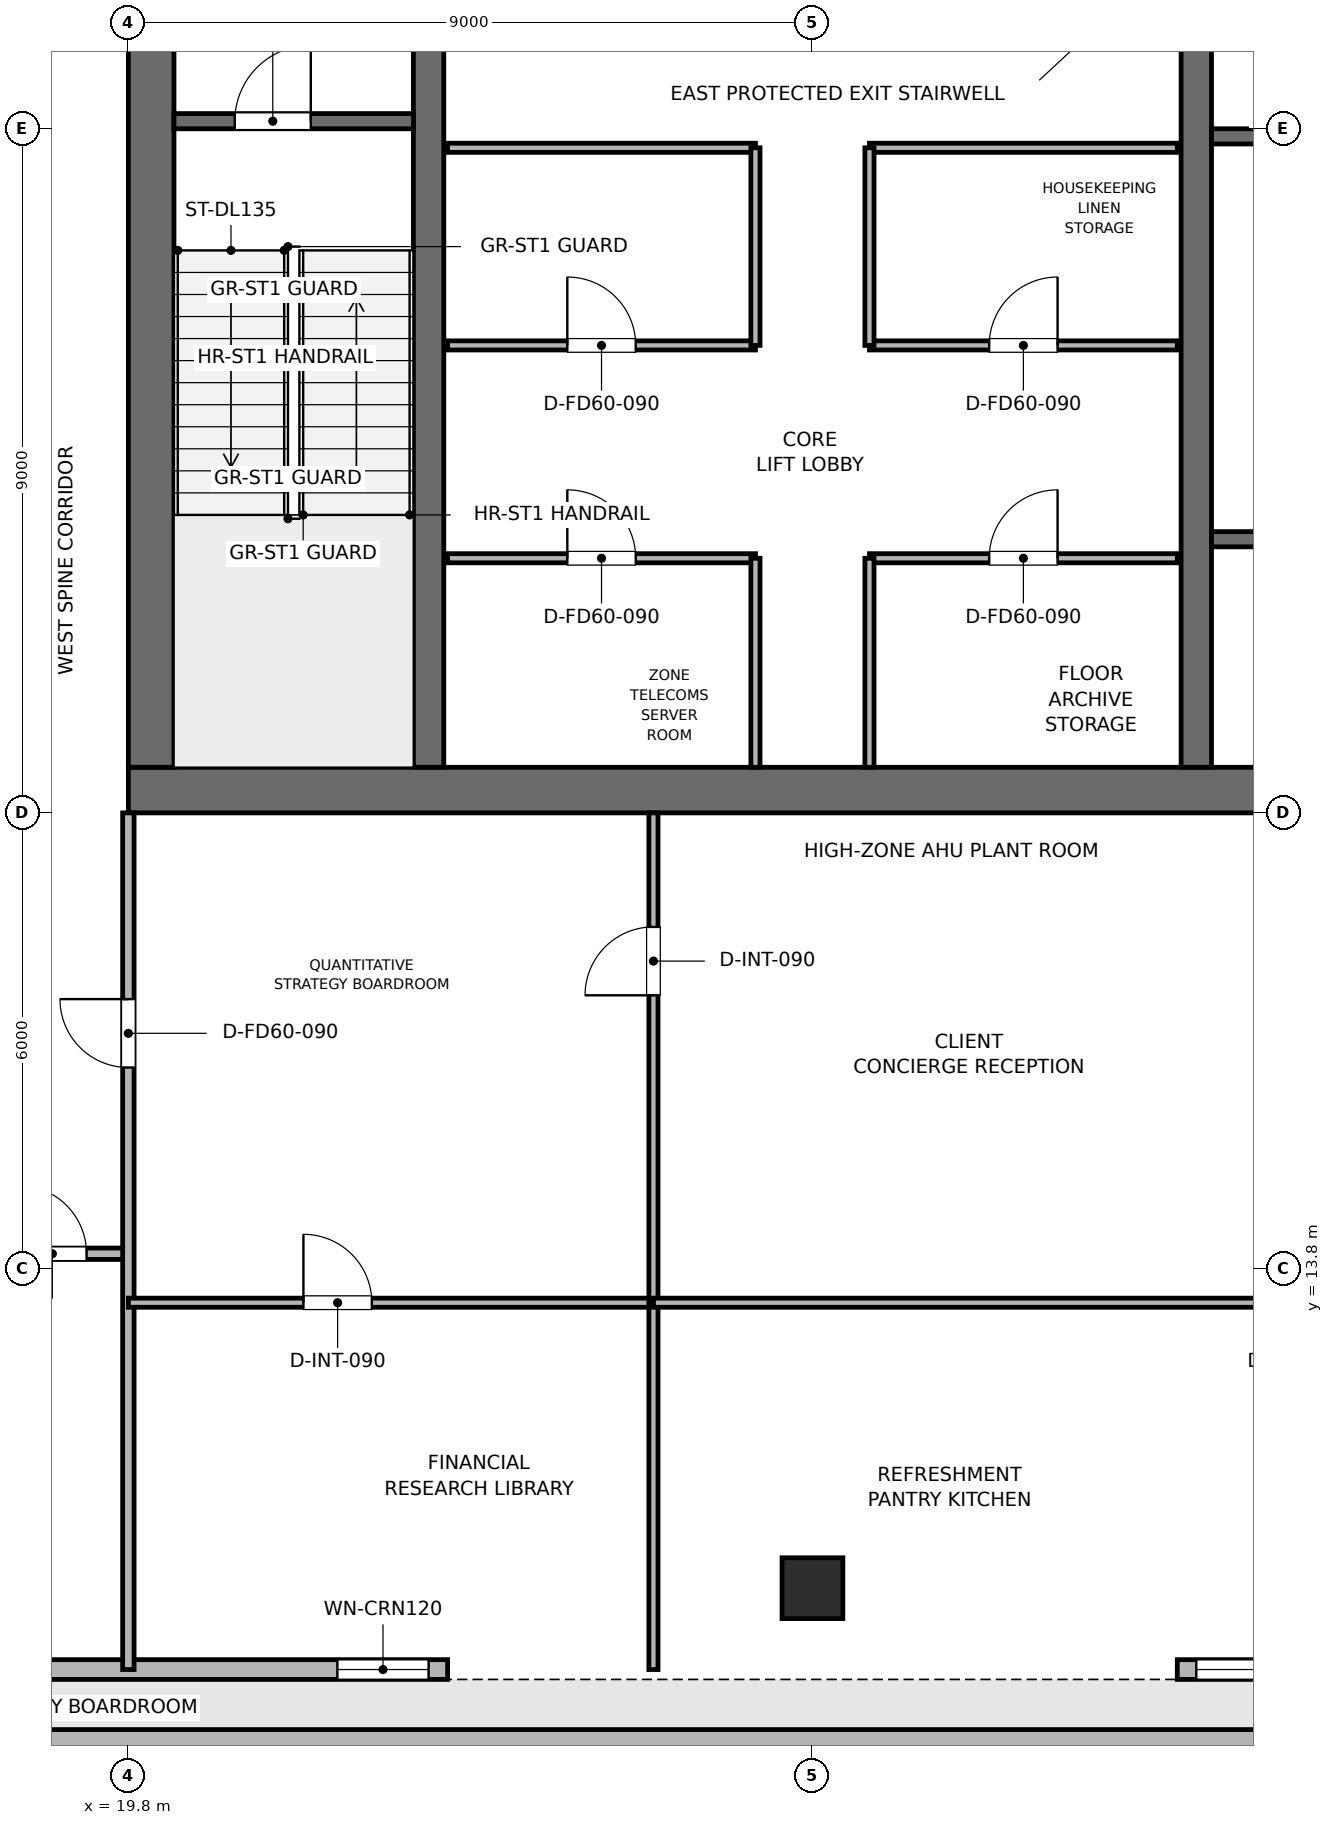
"""IFC4 building model, lengths in metres.
Left out: names, types, materials, properties, quantities, classifications, styles, units other than length and angle.
Written with IfcOpenShell. Run it as: python <this file> out.ifc"""

import sys

from ifc_helpers import new_model, si_unit, direction, frame, frame_2d, origin, origin_2d, place, context, subcontext, project, spatial, rectangle, extrude, element, fill, save


model = new_model("IFC4")
c1 = context("Model", 3, precision=1e-05, world=origin(), true_north=direction((0.0, 1.0)))
c2 = subcontext(c1, "Body", "Model", "MODEL_VIEW")
j1 = project(units=[si_unit("LENGTHUNIT", "METRE"), si_unit("PLANEANGLEUNIT", "RADIAN")], contexts=[c1])
p1 = place(None, origin())
s1 = spatial("IfcSite", under=j1, at=p1, CompositionType="ELEMENT")
p2 = place(p1, origin())
s2 = spatial("IfcBuilding", under=s1, at=p2, CompositionType="ELEMENT")
p3 = place(p2, frame((0.0, 0.0, 355.5)))
s3 = spatial("IfcBuildingStorey", under=s2, at=p3, CompositionType="ELEMENT", Elevation=355.5)
p4 = place(p3, frame((19.8, 20.1, 0.0), z_axis=(0.0, 0.0, 1.0), x_axis=(1.0, 0.0, 0.0)))
e1 = element("IfcWall", 1, at=p4, inside=s3, PredefinedType="SHEAR", context=c2, shape_type="SweptSolid", body=[
    extrude(rectangle(XDim=18.0, YDim=0.6, at=frame_2d((9.0, 0.0))), origin(), (0.0, 0.0, 1.0), 4.5),
])
p5 = place(p3, frame((20.1, 20.4, 0.0), z_axis=(0.0, 0.0, 1.0), x_axis=(0.0, 1.0, 0.0)))
e2 = element("IfcWall", 2, at=p5, inside=s3, PredefinedType="SHEAR", context=c2, shape_type="SweptSolid", body=[
    extrude(rectangle(XDim=16.8, YDim=0.6, at=frame_2d((8.4, 0.0))), origin(), (0.0, 0.0, 1.0), 4.5),
])
p6 = place(p5, frame((10.4, 0.0, 0.0)))
e3 = element("IfcOpeningElement", 3, at=p6, cuts=e2, PredefinedType="OPENING", context=c2, shape_type="SweptSolid", body=[
    extrude(rectangle(XDim=1.1, YDim=2.15, at=frame_2d((0.55, 1.075))), frame((0.0, 0.31, 0.0), z_axis=(0.0, -1.0, 0.0), x_axis=(1.0, 0.0, 0.0)), (0.0, 0.0, 1.0), 0.62),
])
for number, where, z_axis, x_axis in (
    (4, (23.75, 20.4, 0.0), (0.0, 0.0, 1.0), (0.0, 1.0, 0.0)),
    (5, (33.85, 20.4, 0.0), (0.0, 0.0, 1.0), (0.0, 1.0, 0.0)),
):
    element("IfcWall", number, at=place(p3, frame(where, z_axis=z_axis, x_axis=x_axis)), inside=s3, PredefinedType="SHEAR", context=c2, shape_type="SweptSolid", body=[
        extrude(rectangle(XDim=16.8, YDim=0.4, at=frame_2d((8.4, 0.0))), origin(), (0.0, 0.0, 1.0), 4.5),
    ])
p7 = place(p3, frame((28.8, 9.6, 0.003), z_axis=(0.0, 0.0, 1.0), x_axis=(1.0, 0.0, 0.0)))
e6 = element("IfcColumn", 6, at=p7, inside=s3, PredefinedType="COLUMN", context=c2, shape_type="SweptSolid", body=[
    extrude(rectangle(XDim=0.8, YDim=0.8, at=origin_2d()), origin(), (0.0, 0.0, 1.0), 4.234),
])
p8 = place(p3, frame((13.555, 7.62, 0.0), z_axis=(0.0, 0.0, 1.0), x_axis=(1.0, 0.0, 0.0)))
e7 = element("IfcWall", 7, at=p8, inside=s3, PredefinedType="PARAPET", context=c2, shape_type="SweptSolid", body=[
    extrude(rectangle(XDim=30.49, YDim=0.24, at=frame_2d((15.245, 0.0))), origin(), (0.0, 0.0, 1.0), 1.2),
])
p9 = place(p3, frame((43.6, 8.53, 0.0), z_axis=(0.0, 0.0, 1.0), x_axis=(-1.0, 0.0, 0.0)))
e8 = element("IfcWall", 8, at=p9, inside=s3, PredefinedType="SOLIDWALL", context=c2, shape_type="SweptSolid", body=[
    extrude(rectangle(XDim=10.0, YDim=0.26, at=frame_2d((5.0, 0.0))), origin(), (0.0, 0.0, 1.0), 4.24),
])
p10 = place(p9, frame((5.95, 0.0, 0.9)))
e9 = element("IfcOpeningElement", 9, at=p10, cuts=e8, PredefinedType="OPENING", context=c2, shape_type="SweptSolid", body=[
    extrude(rectangle(XDim=3.8, YDim=1.9, at=frame_2d((1.9, 0.95))), frame((0.0, 0.14, 0.0), z_axis=(0.0, -1.0, 0.0), x_axis=(1.0, 0.0, 0.0)), (0.0, 0.0, 1.0), 0.28),
])
p11 = place(p3, frame((24.0, 8.53, 0.0), z_axis=(0.0, 0.0, 1.0), x_axis=(-1.0, 0.0, 0.0)))
e10 = element("IfcWall", 10, at=p11, inside=s3, PredefinedType="SOLIDWALL", context=c2, shape_type="SweptSolid", body=[
    extrude(rectangle(XDim=10.0, YDim=0.26, at=frame_2d((5.0, 0.0))), origin(), (0.0, 0.0, 1.0), 4.24),
])
p12 = place(p11, frame((0.25, 0.0, 0.9)))
e11 = element("IfcOpeningElement", 11, at=p12, cuts=e10, PredefinedType="OPENING", context=c2, shape_type="SweptSolid", body=[
    extrude(rectangle(XDim=1.2, YDim=2.1, at=frame_2d((0.6, 1.05))), frame((0.0, 0.14, 0.0), z_axis=(0.0, -1.0, 0.0), x_axis=(1.0, 0.0, 0.0)), (0.0, 0.0, 1.0), 0.28),
])
p13 = place(p3, frame((20.4, 28.9, 0.0), z_axis=(0.0, 0.0, 1.0), x_axis=(1.0, 0.0, 0.0)))
e12 = element("IfcWall", 12, at=p13, inside=s3, PredefinedType="SHEAR", context=c2, shape_type="SweptSolid", body=[
    extrude(rectangle(XDim=3.15, YDim=0.2, at=frame_2d((1.575, 0.0))), origin(), (0.0, 0.0, 1.0), 4.24),
])
p14 = place(p13, frame((0.8, 0.0, 0.0)))
e13 = element("IfcOpeningElement", 13, at=p14, cuts=e12, PredefinedType="OPENING", context=c2, shape_type="SweptSolid", body=[
    extrude(rectangle(XDim=1.0, YDim=2.1, at=frame_2d((0.5, 1.05))), frame((0.0, 0.11, 0.0), z_axis=(0.0, -1.0, 0.0), x_axis=(1.0, 0.0, 0.0)), (0.0, 0.0, 1.0), 0.22),
])
p15 = place(p3, frame((34.05, 28.7, 0.0), z_axis=(0.0, 0.0, 1.0), x_axis=(1.0, 0.0, 0.0)))
e14 = element("IfcWall", 14, at=p15, inside=s3, PredefinedType="SHEAR", context=c2, shape_type="SweptSolid", body=[
    extrude(rectangle(XDim=3.15, YDim=0.2, at=frame_2d((1.575, 0.0))), origin(), (0.0, 0.0, 1.0), 4.24),
])
p16 = place(p15, frame((0.8, 0.0, 0.0)))
e15 = element("IfcOpeningElement", 15, at=p16, cuts=e14, PredefinedType="OPENING", context=c2, shape_type="SweptSolid", body=[
    extrude(rectangle(XDim=1.0, YDim=2.1, at=frame_2d((0.5, 1.05))), frame((0.0, 0.11, 0.0), z_axis=(0.0, -1.0, 0.0), x_axis=(1.0, 0.0, 0.0)), (0.0, 0.0, 1.0), 0.22),
])
p17 = place(p3, frame((34.05, 23.4, 0.0), z_axis=(0.0, 0.0, 1.0), x_axis=(1.0, 0.0, 0.0)))
e16 = element("IfcWall", 16, at=p17, inside=s3, PredefinedType="SHEAR", context=c2, shape_type="SweptSolid", body=[
    extrude(rectangle(XDim=3.05, YDim=0.2, at=frame_2d((1.525, 0.0))), origin(), (0.0, 0.0, 1.0), 4.24),
])
p18 = place(p17, frame((1.2, 0.0, 0.0)))
e17 = element("IfcOpeningElement", 17, at=p18, cuts=e16, PredefinedType="OPENING", context=c2, shape_type="SweptSolid", body=[
    extrude(rectangle(XDim=1.1, YDim=2.15, at=frame_2d((0.55, 1.075))), frame((0.0, 0.11, 0.0), z_axis=(0.0, -1.0, 0.0), x_axis=(1.0, 0.0, 0.0)), (0.0, 0.0, 1.0), 0.22),
])
p19 = place(p3, frame((24.0, 23.15, 0.0), z_axis=(0.0, 0.0, 1.0), x_axis=(1.0, 0.0, 0.0)))
e18 = element("IfcWall", 18, at=p19, inside=s3, PredefinedType="PARTITIONING", context=c2, shape_type="SweptSolid", body=[
    extrude(rectangle(XDim=4.05, YDim=0.12, at=frame_2d((2.025, 0.0))), origin(), (0.0, 0.0, 1.0), 4.24),
])
p20 = place(p19, frame((1.575, 0.0, 0.0)))
e19 = element("IfcOpeningElement", 19, at=p20, cuts=e18, PredefinedType="OPENING", context=c2, shape_type="SweptSolid", body=[
    extrude(rectangle(XDim=0.9, YDim=2.1, at=frame_2d((0.45, 1.05))), frame((0.0, 0.07, 0.0), z_axis=(0.0, -1.0, 0.0), x_axis=(1.0, 0.0, 0.0)), (0.0, 0.0, 1.0), 0.14),
])
p21 = place(p3, frame((28.05, 20.4, 0.0), z_axis=(0.0, 0.0, 1.0), x_axis=(0.0, 1.0, 0.0)))
e20 = element("IfcWall", 20, at=p21, inside=s3, PredefinedType="PARTITIONING", context=c2, shape_type="SweptSolid", body=[
    extrude(rectangle(XDim=2.75, YDim=0.12, at=frame_2d((1.375, 0.0))), origin(), (0.0, 0.0, 1.0), 4.24),
])
p22 = place(p3, frame((29.55, 23.15, 0.0), z_axis=(0.0, 0.0, 1.0), x_axis=(1.0, 0.0, 0.0)))
e21 = element("IfcWall", 21, at=p22, inside=s3, PredefinedType="PARTITIONING", context=c2, shape_type="SweptSolid", body=[
    extrude(rectangle(XDim=4.05, YDim=0.12, at=frame_2d((2.025, 0.0))), origin(), (0.0, 0.0, 1.0), 4.24),
])
p23 = place(p22, frame((1.575, 0.0, 0.0)))
e22 = element("IfcOpeningElement", 22, at=p23, cuts=e21, PredefinedType="OPENING", context=c2, shape_type="SweptSolid", body=[
    extrude(rectangle(XDim=0.9, YDim=2.1, at=frame_2d((0.45, 1.05))), frame((0.0, 0.07, 0.0), z_axis=(0.0, -1.0, 0.0), x_axis=(1.0, 0.0, 0.0)), (0.0, 0.0, 1.0), 0.14),
])
p24 = place(p3, frame((29.55, 20.4, 0.0), z_axis=(0.0, 0.0, 1.0), x_axis=(0.0, 1.0, 0.0)))
e23 = element("IfcWall", 23, at=p24, inside=s3, PredefinedType="PARTITIONING", context=c2, shape_type="SweptSolid", body=[
    extrude(rectangle(XDim=2.75, YDim=0.12, at=frame_2d((1.375, 0.0))), origin(), (0.0, 0.0, 1.0), 4.24),
])
p25 = place(p3, frame((24.0, 25.95, 0.0), z_axis=(0.0, 0.0, 1.0), x_axis=(1.0, 0.0, 0.0)))
e24 = element("IfcWall", 24, at=p25, inside=s3, PredefinedType="PARTITIONING", context=c2, shape_type="SweptSolid", body=[
    extrude(rectangle(XDim=4.05, YDim=0.12, at=frame_2d((2.025, 0.0))), origin(), (0.0, 0.0, 1.0), 4.24),
])
p26 = place(p25, frame((1.575, 0.0, 0.0)))
e25 = element("IfcOpeningElement", 25, at=p26, cuts=e24, PredefinedType="OPENING", context=c2, shape_type="SweptSolid", body=[
    extrude(rectangle(XDim=0.9, YDim=2.1, at=frame_2d((0.45, 1.05))), frame((0.0, 0.07, 0.0), z_axis=(0.0, -1.0, 0.0), x_axis=(1.0, 0.0, 0.0)), (0.0, 0.0, 1.0), 0.14),
])
p27 = place(p3, frame((24.0, 28.55, 0.0), z_axis=(0.0, 0.0, 1.0), x_axis=(1.0, 0.0, 0.0)))
e26 = element("IfcWall", 26, at=p27, inside=s3, PredefinedType="PARTITIONING", context=c2, shape_type="SweptSolid", body=[
    extrude(rectangle(XDim=4.05, YDim=0.12, at=frame_2d((2.025, 0.0))), origin(), (0.0, 0.0, 1.0), 4.24),
])
p28 = place(p3, frame((28.05, 25.95, 0.0), z_axis=(0.0, 0.0, 1.0), x_axis=(0.0, 1.0, 0.0)))
e27 = element("IfcWall", 27, at=p28, inside=s3, PredefinedType="PARTITIONING", context=c2, shape_type="SweptSolid", body=[
    extrude(rectangle(XDim=2.6, YDim=0.12, at=frame_2d((1.3, 0.0))), origin(), (0.0, 0.0, 1.0), 4.24),
])
p29 = place(p3, frame((29.55, 25.95, 0.0), z_axis=(0.0, 0.0, 1.0), x_axis=(1.0, 0.0, 0.0)))
e28 = element("IfcWall", 28, at=p29, inside=s3, PredefinedType="PARTITIONING", context=c2, shape_type="SweptSolid", body=[
    extrude(rectangle(XDim=4.05, YDim=0.12, at=frame_2d((2.025, 0.0))), origin(), (0.0, 0.0, 1.0), 4.24),
])
p30 = place(p29, frame((1.575, 0.0, 0.0)))
e29 = element("IfcOpeningElement", 29, at=p30, cuts=e28, PredefinedType="OPENING", context=c2, shape_type="SweptSolid", body=[
    extrude(rectangle(XDim=0.9, YDim=2.1, at=frame_2d((0.45, 1.05))), frame((0.0, 0.07, 0.0), z_axis=(0.0, -1.0, 0.0), x_axis=(1.0, 0.0, 0.0)), (0.0, 0.0, 1.0), 0.14),
])
p31 = place(p3, frame((29.55, 28.55, 0.0), z_axis=(0.0, 0.0, 1.0), x_axis=(1.0, 0.0, 0.0)))
e30 = element("IfcWall", 30, at=p31, inside=s3, PredefinedType="PARTITIONING", context=c2, shape_type="SweptSolid", body=[
    extrude(rectangle(XDim=4.05, YDim=0.12, at=frame_2d((2.025, 0.0))), origin(), (0.0, 0.0, 1.0), 4.24),
])
p32 = place(p3, frame((29.55, 25.95, 0.0), z_axis=(0.0, 0.0, 1.0), x_axis=(0.0, 1.0, 0.0)))
e31 = element("IfcWall", 31, at=p32, inside=s3, PredefinedType="PARTITIONING", context=c2, shape_type="SweptSolid", body=[
    extrude(rectangle(XDim=2.6, YDim=0.12, at=frame_2d((1.3, 0.0))), origin(), (0.0, 0.0, 1.0), 4.24),
])
p33 = place(p3, frame((17.9, 14.0, 0.0), z_axis=(0.0, 0.0, 1.0), x_axis=(1.0, 0.0, 0.0)))
e32 = element("IfcWall", 32, at=p33, inside=s3, PredefinedType="PARTITIONING", context=c2, shape_type="SweptSolid", body=[
    extrude(rectangle(XDim=1.9, YDim=0.15, at=frame_2d((0.95, 0.0))), origin(), (0.0, 0.0, 1.0), 4.24),
])
p34 = place(p33, frame((0.45, 0.0, 0.0)))
e33 = element("IfcOpeningElement", 33, at=p34, cuts=e32, PredefinedType="OPENING", context=c2, shape_type="SweptSolid", body=[
    extrude(rectangle(XDim=0.9, YDim=2.1, at=frame_2d((0.45, 1.05))), frame((0.0, 0.085, 0.0), z_axis=(0.0, -1.0, 0.0), x_axis=(1.0, 0.0, 0.0)), (0.0, 0.0, 1.0), 0.17),
])
p35 = place(p3, frame((19.8, 8.53, 0.0), z_axis=(0.0, 0.0, 1.0), x_axis=(0.0, 1.0, 0.0)))
e34 = element("IfcWall", 34, at=p35, inside=s3, PredefinedType="PARTITIONING", context=c2, shape_type="SweptSolid", body=[
    extrude(rectangle(XDim=11.27, YDim=0.15, at=frame_2d((5.635, 0.0))), origin(), (0.0, 0.0, 1.0), 3.825),
])
p36 = place(p35, frame((7.92, 0.0, 0.0)))
e35 = element("IfcOpeningElement", 35, at=p36, cuts=e34, PredefinedType="OPENING", context=c2, shape_type="SweptSolid", body=[
    extrude(rectangle(XDim=0.9, YDim=2.1, at=frame_2d((0.45, 1.05))), frame((0.0, 0.085, 0.0), z_axis=(0.0, -1.0, 0.0), x_axis=(1.0, 0.0, 0.0)), (0.0, 0.0, 1.0), 0.17),
])
p37 = place(p3, frame((19.8, 13.356, 0.0), z_axis=(0.0, 0.0, 1.0), x_axis=(1.0, 0.0, 0.0)))
e36 = element("IfcWall", 36, at=p37, inside=s3, PredefinedType="PARTITIONING", context=c2, shape_type="SweptSolid", body=[
    extrude(rectangle(XDim=6.908, YDim=0.12, at=frame_2d((3.454, 0.0))), origin(), (0.0, 0.0, 1.0), 3.825),
])
p38 = place(p37, frame((2.303, 0.0, 0.0)))
e37 = element("IfcOpeningElement", 37, at=p38, cuts=e36, PredefinedType="OPENING", context=c2, shape_type="SweptSolid", body=[
    extrude(rectangle(XDim=0.9, YDim=2.1, at=frame_2d((0.45, 1.05))), frame((0.0, 0.07, 0.0), z_axis=(0.0, -1.0, 0.0), x_axis=(1.0, 0.0, 0.0)), (0.0, 0.0, 1.0), 0.14),
])
p39 = place(p3, frame((26.708, 8.53, 0.0), z_axis=(0.0, 0.0, 1.0), x_axis=(0.0, 1.0, 0.0)))
e38 = element("IfcWall", 38, at=p39, inside=s3, PredefinedType="PARTITIONING", context=c2, shape_type="SweptSolid", body=[
    extrude(rectangle(XDim=11.27, YDim=0.12, at=frame_2d((5.635, 0.0))), origin(), (0.0, 0.0, 1.0), 3.865),
])
p40 = place(p39, frame((8.87, 0.0, 0.0)))
e39 = element("IfcOpeningElement", 39, at=p40, cuts=e38, PredefinedType="OPENING", context=c2, shape_type="SweptSolid", body=[
    extrude(rectangle(XDim=0.9, YDim=2.1, at=frame_2d((0.45, 1.05))), frame((0.0, 0.07, 0.0), z_axis=(0.0, -1.0, 0.0), x_axis=(1.0, 0.0, 0.0)), (0.0, 0.0, 1.0), 0.14),
])
p41 = place(p3, frame((26.708, 13.356, 0.0), z_axis=(0.0, 0.0, 1.0), x_axis=(1.0, 0.0, 0.0)))
e40 = element("IfcWall", 40, at=p41, inside=s3, PredefinedType="PARTITIONING", context=c2, shape_type="SweptSolid", body=[
    extrude(rectangle(XDim=16.892, YDim=0.12, at=frame_2d((8.446, 0.0))), origin(), (0.0, 0.0, 1.0), 3.825),
])
p42 = place(p41, frame((7.996, 0.0, 0.0)))
e41 = element("IfcOpeningElement", 41, at=p42, cuts=e40, PredefinedType="OPENING", context=c2, shape_type="SweptSolid", body=[
    extrude(rectangle(XDim=0.9, YDim=2.1, at=frame_2d((0.45, 1.05))), frame((0.0, 0.07, 0.0), z_axis=(0.0, -1.0, 0.0), x_axis=(1.0, 0.0, 0.0)), (0.0, 0.0, 1.0), 0.14),
])
p43 = place(p10, origin())
e42 = element("IfcWindow", 42, at=p43, inside=s3, PartitioningType="SINGLE_PANEL", PredefinedType="WINDOW", context=c2, shape_type="SweptSolid", body=[
    extrude(rectangle(XDim=3.8, YDim=1.9, at=frame_2d((1.9, 0.95))), frame((0.0, 0.03, 0.0), z_axis=(0.0, -1.0, 0.0), x_axis=(1.0, 0.0, 0.0)), (0.0, 0.0, 1.0), 0.06),
])
fill(e9, e42)
p44 = place(p12, origin())
e43 = element("IfcWindow", 43, at=p44, inside=s3, PartitioningType="SINGLE_PANEL", PredefinedType="WINDOW", context=c2, shape_type="SweptSolid", body=[
    extrude(rectangle(XDim=1.2, YDim=2.1, at=frame_2d((0.6, 1.05))), frame((0.0, 0.03, 0.0), z_axis=(0.0, -1.0, 0.0), x_axis=(1.0, 0.0, 0.0)), (0.0, 0.0, 1.0), 0.06),
])
fill(e11, e43)
p45 = place(p14, origin())
e44 = element("IfcDoor", 44, at=p45, inside=s3, OperationType="SINGLE_SWING_RIGHT", PredefinedType="DOOR", context=c2, shape_type="SweptSolid", body=[
    extrude(rectangle(XDim=1.0, YDim=2.1, at=frame_2d((0.5, 1.05))), frame((0.0, 0.025, 0.0), z_axis=(0.0, -1.0, 0.0), x_axis=(1.0, 0.0, 0.0)), (0.0, 0.0, 1.0), 0.05),
])
fill(e13, e44)
p46 = place(p20, origin())
e45 = element("IfcDoor", 45, at=p46, inside=s3, OperationType="SINGLE_SWING_LEFT", PredefinedType="DOOR", context=c2, shape_type="SweptSolid", body=[
    extrude(rectangle(XDim=0.9, YDim=2.1, at=frame_2d((0.45, 1.05))), frame((0.0, 0.025, 0.0), z_axis=(0.0, -1.0, 0.0), x_axis=(1.0, 0.0, 0.0)), (0.0, 0.0, 1.0), 0.05),
])
fill(e19, e45)
p47 = place(p23, origin())
e46 = element("IfcDoor", 46, at=p47, inside=s3, OperationType="SINGLE_SWING_RIGHT", PredefinedType="DOOR", context=c2, shape_type="SweptSolid", body=[
    extrude(rectangle(XDim=0.9, YDim=2.1, at=frame_2d((0.45, 1.05))), frame((0.0, 0.025, 0.0), z_axis=(0.0, -1.0, 0.0), x_axis=(1.0, 0.0, 0.0)), (0.0, 0.0, 1.0), 0.05),
])
fill(e22, e46)
p48 = place(p26, origin())
e47 = element("IfcDoor", 47, at=p48, inside=s3, OperationType="SINGLE_SWING_LEFT", PredefinedType="DOOR", context=c2, shape_type="SweptSolid", body=[
    extrude(rectangle(XDim=0.9, YDim=2.1, at=frame_2d((0.45, 1.05))), frame((0.0, 0.025, 0.0), z_axis=(0.0, -1.0, 0.0), x_axis=(1.0, 0.0, 0.0)), (0.0, 0.0, 1.0), 0.05),
])
fill(e25, e47)
p49 = place(p30, origin())
e48 = element("IfcDoor", 48, at=p49, inside=s3, OperationType="SINGLE_SWING_RIGHT", PredefinedType="DOOR", context=c2, shape_type="SweptSolid", body=[
    extrude(rectangle(XDim=0.9, YDim=2.1, at=frame_2d((0.45, 1.05))), frame((0.0, 0.025, 0.0), z_axis=(0.0, -1.0, 0.0), x_axis=(1.0, 0.0, 0.0)), (0.0, 0.0, 1.0), 0.05),
])
fill(e29, e48)
p50 = place(p34, origin())
e49 = element("IfcDoor", 49, at=p50, inside=s3, OperationType="SINGLE_SWING_LEFT", PredefinedType="DOOR", context=c2, shape_type="SweptSolid", body=[
    extrude(rectangle(XDim=0.9, YDim=2.1, at=frame_2d((0.45, 1.05))), frame((0.0, 0.025, 0.0), z_axis=(0.0, -1.0, 0.0), x_axis=(1.0, 0.0, 0.0)), (0.0, 0.0, 1.0), 0.05),
])
fill(e33, e49)
p51 = place(p36, origin())
e50 = element("IfcDoor", 50, at=p51, inside=s3, OperationType="SINGLE_SWING_RIGHT", PredefinedType="DOOR", context=c2, shape_type="SweptSolid", body=[
    extrude(rectangle(XDim=0.9, YDim=2.1, at=frame_2d((0.45, 1.05))), frame((0.0, 0.025, 0.0), z_axis=(0.0, -1.0, 0.0), x_axis=(1.0, 0.0, 0.0)), (0.0, 0.0, 1.0), 0.05),
])
fill(e35, e50)
p52 = place(p38, origin())
e51 = element("IfcDoor", 51, at=p52, inside=s3, OperationType="SINGLE_SWING_LEFT", PredefinedType="DOOR", context=c2, shape_type="SweptSolid", body=[
    extrude(rectangle(XDim=0.9, YDim=2.1, at=frame_2d((0.45, 1.05))), frame((0.0, 0.025, 0.0), z_axis=(0.0, -1.0, 0.0), x_axis=(1.0, 0.0, 0.0)), (0.0, 0.0, 1.0), 0.05),
])
fill(e37, e51)
p53 = place(p40, origin())
e52 = element("IfcDoor", 52, at=p53, inside=s3, OperationType="SINGLE_SWING_LEFT", PredefinedType="DOOR", context=c2, shape_type="SweptSolid", body=[
    extrude(rectangle(XDim=0.9, YDim=2.1, at=frame_2d((0.45, 1.05))), frame((0.0, 0.025, 0.0), z_axis=(0.0, -1.0, 0.0), x_axis=(1.0, 0.0, 0.0)), (0.0, 0.0, 1.0), 0.05),
])
fill(e39, e52)
save(model, sys.argv[1])
